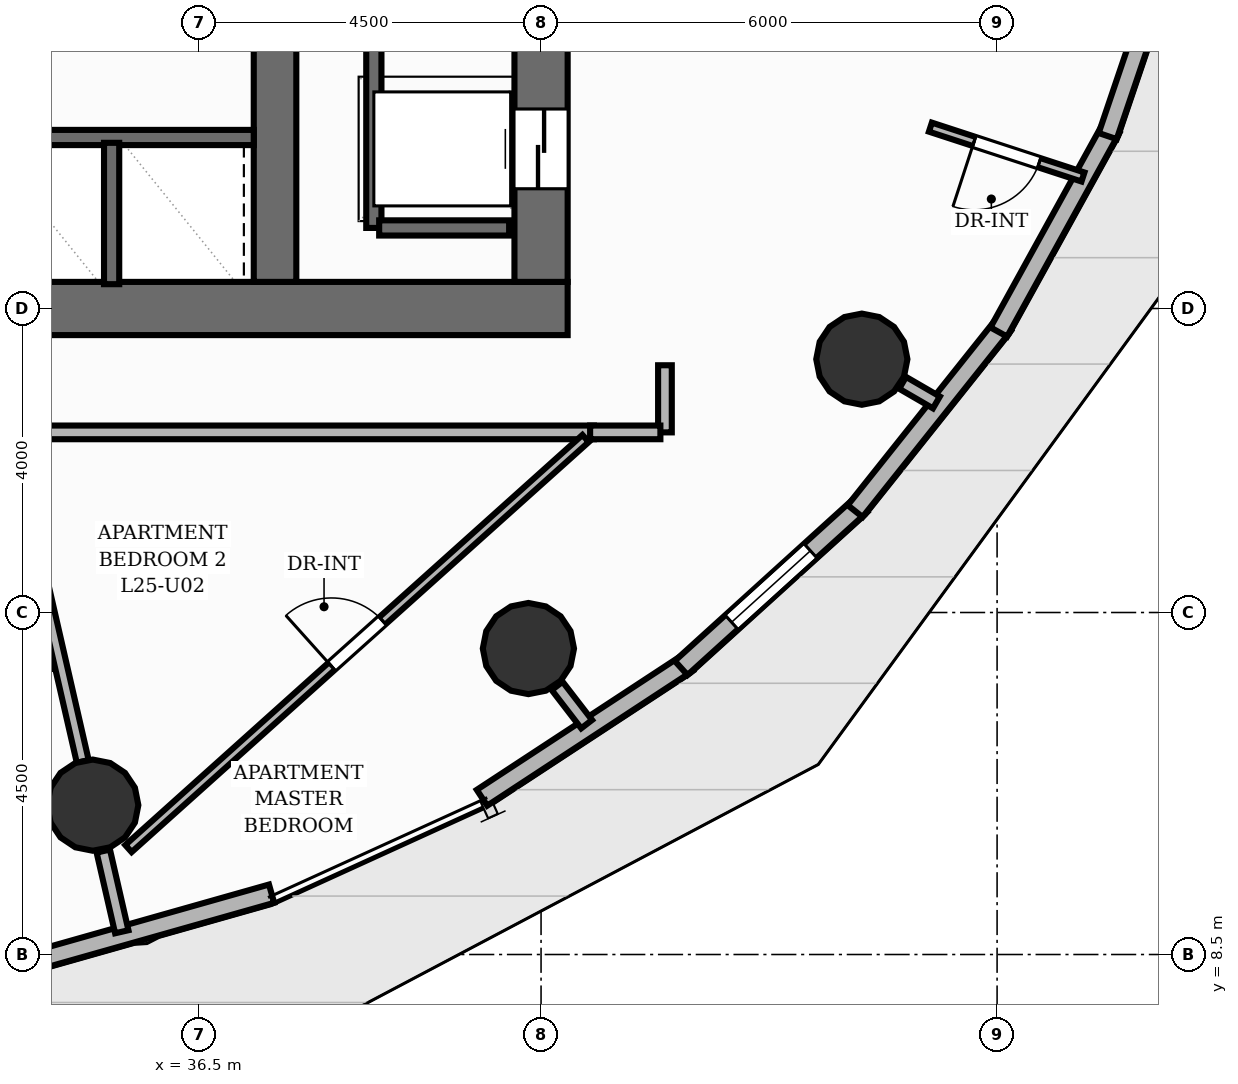
"""IFC4 building model, lengths in metres.
Left out: names, types, materials, properties, quantities, classifications, styles, units other than length and angle.
Written with IfcOpenShell. Run it as: python <this file> out.ifc"""

import sys

from ifc_helpers import new_model, si_unit, direction, frame, frame_2d, origin, origin_2d, place, context, subcontext, project, spatial, rectangle, circle, extrude, element, fill, save


model = new_model("IFC4")
c1 = context("Model", 3, precision=1e-05, world=origin(), true_north=direction((0.0, 1.0)))
c2 = subcontext(c1, "Body", "Model", "MODEL_VIEW")
j1 = project(units=[si_unit("LENGTHUNIT", "METRE"), si_unit("PLANEANGLEUNIT", "RADIAN")], contexts=[c1])
p1 = place(None, origin())
s1 = spatial("IfcSite", under=j1, at=p1, CompositionType="ELEMENT")
p2 = place(p1, origin())
s2 = spatial("IfcBuilding", under=s1, at=p2, CompositionType="ELEMENT")
p3 = place(p2, frame((0.0, 0.0, 86.88)))
s3 = spatial("IfcBuildingStorey", under=s2, at=p3, CompositionType="ELEMENT", Elevation=86.88)
p4 = place(p3, frame((22.65, 17.0, 0.0), z_axis=(0.0, 0.0, 1.0), x_axis=(1.0, 0.0, 0.0)))
e1 = element("IfcWall", 1, at=p4, inside=s3, PredefinedType="SHEAR", context=c2, shape_type="SweptSolid", body=[
    extrude(rectangle(XDim=18.7, YDim=0.7, at=frame_2d((9.35, 0.0))), origin(), (0.0, 0.0, 1.0), 3.2),
])
p5 = place(p4, frame((5.85, 0.0, 0.0)))
e2 = element("IfcOpeningElement", 2, at=p5, cuts=e1, PredefinedType="OPENING", context=c2, shape_type="SweptSolid", body=[
    extrude(rectangle(XDim=1.1, YDim=2.15, at=frame_2d((0.55, 1.075))), frame((0.0, 0.36, 0.0), z_axis=(0.0, -1.0, 0.0), x_axis=(1.0, 0.0, 0.0)), (0.0, 0.0, 1.0), 0.72),
])
p6 = place(p4, frame((9.4, 0.0, 0.0)))
e3 = element("IfcOpeningElement", 3, at=p6, cuts=e1, PredefinedType="OPENING", context=c2, shape_type="SweptSolid", body=[
    extrude(rectangle(XDim=0.9, YDim=2.1, at=frame_2d((0.45, 1.05))), frame((0.0, 0.36, 0.0), z_axis=(0.0, -1.0, 0.0), x_axis=(1.0, 0.0, 0.0)), (0.0, 0.0, 1.0), 0.72),
])
p7 = place(p3, frame((41.0, 17.35, 0.0), z_axis=(0.0, 0.0, 1.0), x_axis=(0.0, 1.0, 0.0)))
e4 = element("IfcWall", 4, at=p7, inside=s3, PredefinedType="SHEAR", context=c2, shape_type="SweptSolid", body=[
    extrude(rectangle(XDim=13.3, YDim=0.7, at=frame_2d((6.65, 0.0))), origin(), (0.0, 0.0, 1.0), 3.2),
])
p8 = place(p7, frame((1.225, 0.0, 0.0)))
e5 = element("IfcOpeningElement", 5, at=p8, cuts=e4, PredefinedType="OPENING", context=c2, shape_type="SweptSolid", body=[
    extrude(rectangle(XDim=1.05, YDim=2.15, at=frame_2d((0.525, 1.075))), frame((0.0, 0.36, 0.0), z_axis=(0.0, -1.0, 0.0), x_axis=(1.0, 0.0, 0.0)), (0.0, 0.0, 1.0), 0.72),
])
p9 = place(p7, frame((4.475, 0.0, 0.0)))
e6 = element("IfcOpeningElement", 6, at=p9, cuts=e4, PredefinedType="OPENING", context=c2, shape_type="SweptSolid", body=[
    extrude(rectangle(XDim=1.05, YDim=2.15, at=frame_2d((0.525, 1.075))), frame((0.0, 0.36, 0.0), z_axis=(0.0, -1.0, 0.0), x_axis=(1.0, 0.0, 0.0)), (0.0, 0.0, 1.0), 0.72),
])
p10 = place(p7, frame((7.775, 0.0, 0.0)))
e7 = element("IfcOpeningElement", 7, at=p10, cuts=e4, PredefinedType="OPENING", context=c2, shape_type="SweptSolid", body=[
    extrude(rectangle(XDim=1.05, YDim=2.15, at=frame_2d((0.525, 1.075))), frame((0.0, 0.36, 0.0), z_axis=(0.0, -1.0, 0.0), x_axis=(1.0, 0.0, 0.0)), (0.0, 0.0, 1.0), 0.72),
])
p11 = place(p7, frame((11.025, 0.0, 0.0)))
e8 = element("IfcOpeningElement", 8, at=p11, cuts=e4, PredefinedType="OPENING", context=c2, shape_type="SweptSolid", body=[
    extrude(rectangle(XDim=1.05, YDim=2.15, at=frame_2d((0.525, 1.075))), frame((0.0, 0.36, 0.0), z_axis=(0.0, -1.0, 0.0), x_axis=(1.0, 0.0, 0.0)), (0.0, 0.0, 1.0), 0.72),
])
p12 = place(p3, frame((37.5, 17.35, 0.0), z_axis=(0.0, 0.0, 1.0), x_axis=(0.0, 1.0, 0.0)))
e9 = element("IfcWall", 9, at=p12, inside=s3, PredefinedType="SHEAR", context=c2, shape_type="SweptSolid", body=[
    extrude(rectangle(XDim=13.3, YDim=0.56, at=frame_2d((6.65, 0.0))), origin(), (0.0, 0.0, 1.0), 3.2),
])
for number, where, z_axis, x_axis in (
    (10, (35.102, 10.465, 0.0), (0.0, 0.0, 1.0), (1.0, 0.0, 0.0)),
    (11, (40.833, 12.526, 0.0), (0.0, 0.0, 1.0), (1.0, 0.0, 0.0)),
    (12, (45.22, 16.333, 0.0), (0.0, 0.0, 1.0), (1.0, 0.0, 0.0)),
):
    element("IfcColumn", number, at=place(p3, frame(where, z_axis=z_axis, x_axis=x_axis)), inside=s3, PredefinedType="COLUMN", context=c2, shape_type="SweptSolid", body=[
        extrude(circle(Radius=0.6, at=origin_2d()), origin(), (0.0, 0.0, 1.0), 3.2),
    ])
p13 = place(p3, frame((37.455, 9.301, 0.0), z_axis=(0.0, 0.0, 1.0), x_axis=(-0.962134911526, -0.272573681825, 0.0)))
e13 = element("IfcWall", 13, at=p13, inside=s3, PredefinedType="SOLIDWALL", context=c2, shape_type="SweptSolid", body=[
    extrude(rectangle(XDim=3.26, YDim=0.25, at=frame_2d((1.63, 0.0))), origin(), (0.0, 0.0, 1.0), 2.96),
])
p14 = place(p3, frame((42.929, 12.337, 0.0), z_axis=(0.0, 0.0, 1.0), x_axis=(-0.836273856728, -0.548311988336, 0.0)))
e14 = element("IfcWall", 14, at=p14, inside=s3, PredefinedType="SOLIDWALL", context=c2, shape_type="SweptSolid", body=[
    extrude(rectangle(XDim=3.236, YDim=0.25, at=frame_2d((1.618, 0.0))), origin(), (0.0, 0.0, 1.0), 2.96),
])
p15 = place(p3, frame((45.208, 14.414, 0.0), z_axis=(0.0, 0.0, 1.0), x_axis=(-0.740832321657, -0.671690011232, 0.0)))
e15 = element("IfcWall", 15, at=p15, inside=s3, PredefinedType="SOLIDWALL", context=c2, shape_type="SweptSolid", body=[
    extrude(rectangle(XDim=3.192, YDim=0.25, at=frame_2d((1.596, 0.0))), origin(), (0.0, 0.0, 1.0), 2.96),
])
p16 = place(p15, frame((0.896, 0.0, 0.85)))
e16 = element("IfcOpeningElement", 16, at=p16, cuts=e15, PredefinedType="OPENING", context=c2, shape_type="SweptSolid", body=[
    extrude(rectangle(XDim=1.4, YDim=1.55, at=frame_2d((0.7, 0.775))), frame((0.0, 0.135, 0.0), z_axis=(0.0, -1.0, 0.0), x_axis=(1.0, 0.0, 0.0)), (0.0, 0.0, 1.0), 0.27),
])
p17 = place(p3, frame((47.084, 16.783, 0.0), z_axis=(0.0, 0.0, 1.0), x_axis=(-0.623134406496, -0.782114768714, 0.0)))
e17 = element("IfcWall", 17, at=p17, inside=s3, PredefinedType="SOLIDWALL", context=c2, shape_type="SweptSolid", body=[
    extrude(rectangle(XDim=3.131, YDim=0.25, at=frame_2d((1.565, 0.0))), origin(), (0.0, 0.0, 1.0), 2.96),
])
p18 = place(p3, frame((48.5, 19.371, 0.0), z_axis=(0.0, 0.0, 1.0), x_axis=(-0.482904421948, -0.875673066426, 0.0)))
e18 = element("IfcWall", 18, at=p18, inside=s3, PredefinedType="SOLIDWALL", context=c2, shape_type="SweptSolid", body=[
    extrude(rectangle(XDim=3.061, YDim=0.25, at=frame_2d((1.53, 0.0))), origin(), (0.0, 0.0, 1.0), 2.96),
])
p19 = place(p3, frame((49.415, 22.099, 0.0), z_axis=(0.0, 0.0, 1.0), x_axis=(-0.321149814784, -0.947028403198, 0.0)))
e19 = element("IfcWall", 19, at=p19, inside=s3, PredefinedType="SOLIDWALL", context=c2, shape_type="SweptSolid", body=[
    extrude(rectangle(XDim=2.988, YDim=0.25, at=frame_2d((1.494, 0.0))), origin(), (0.0, 0.0, 1.0), 2.96),
])
p20 = place(p3, frame((38.8, 18.06, 0.0), z_axis=(0.0, 0.0, 1.0), x_axis=(0.0, 1.0, 0.0)))
e20 = element("IfcWall", 20, at=p20, inside=s3, PredefinedType="SHEAR", context=c2, shape_type="SweptSolid", body=[
    extrude(rectangle(XDim=11.88, YDim=0.2, at=frame_2d((5.94, 0.0))), origin(), (0.0, 0.0, 1.0), 3.2),
])
p21 = place(p3, frame((38.87, 18.06, 0.0), z_axis=(0.0, 0.0, 1.0), x_axis=(1.0, 0.0, 0.0)))
e21 = element("IfcWall", 21, at=p21, inside=s3, PredefinedType="SHEAR", context=c2, shape_type="SweptSolid", body=[
    extrude(rectangle(XDim=1.71, YDim=0.2, at=frame_2d((0.855, 0.0))), origin(), (0.0, 0.0, 1.0), 3.2),
])
p22 = place(p3, frame((33.5, 19.25, 0.0), z_axis=(0.0, 0.0, 1.0), x_axis=(1.0, 0.0, 0.0)))
e22 = element("IfcWall", 22, at=p22, inside=s3, PredefinedType="SHEAR", context=c2, shape_type="SweptSolid", body=[
    extrude(rectangle(XDim=3.72, YDim=0.2, at=frame_2d((1.86, 0.0))), origin(), (0.0, 0.0, 1.0), 3.2),
])
p23 = place(p3, frame((35.35, 17.32, 0.0), z_axis=(0.0, 0.0, 1.0), x_axis=(0.0, 1.0, 0.0)))
e23 = element("IfcWall", 23, at=p23, inside=s3, PredefinedType="SHEAR", context=c2, shape_type="SweptSolid", body=[
    extrude(rectangle(XDim=1.86, YDim=0.2, at=frame_2d((0.93, 0.0))), origin(), (0.0, 0.0, 1.0), 3.2),
])
p24 = place(p3, frame((35.24, 9.861, 0.0), z_axis=(0.0, 0.0, 1.0), x_axis=(0.223287406217, -0.974752652843, 0.0)))
e24 = element("IfcWall", 24, at=p24, inside=s3, PredefinedType="PARTITIONING", context=c2, shape_type="SweptSolid", body=[
    extrude(rectangle(XDim=1.089, YDim=0.18, at=frame_2d((0.544, 0.0))), origin(), (0.0, 0.0, 1.0), 2.261),
])
p25 = place(p3, frame((41.212, 12.034, 0.0), z_axis=(0.0, 0.0, 1.0), x_axis=(0.609970610867, -0.792424036661, 0.0)))
e25 = element("IfcWall", 25, at=p25, inside=s3, PredefinedType="PARTITIONING", context=c2, shape_type="SweptSolid", body=[
    extrude(rectangle(XDim=0.635, YDim=0.18, at=frame_2d((0.318, 0.0))), origin(), (0.0, 0.0, 1.0), 2.261),
])
p26 = place(p3, frame((45.757, 16.022, 0.0), z_axis=(0.0, 0.0, 1.0), x_axis=(0.864981735625, -0.501803344981, 0.0)))
e26 = element("IfcWall", 26, at=p26, inside=s3, PredefinedType="PARTITIONING", context=c2, shape_type="SweptSolid", body=[
    extrude(rectangle(XDim=0.514, YDim=0.18, at=frame_2d((0.257, 0.0))), origin(), (0.0, 0.0, 1.0), 2.261),
])
p27 = place(p3, frame((41.695, 15.37, 0.0), z_axis=(0.0, 0.0, 1.0), x_axis=(-1.0, 0.0, 0.0)))
e27 = element("IfcWall", 27, at=p27, inside=s3, PredefinedType="PARTITIONING", context=c2, shape_type="SweptSolid", body=[
    extrude(rectangle(XDim=20.325, YDim=0.18, at=frame_2d((10.163, 0.0))), origin(), (0.0, 0.0, 1.0), 2.955),
])
p28 = place(p27, frame((11.424, 0.0, 0.0)))
e28 = element("IfcOpeningElement", 28, at=p28, cuts=e27, PredefinedType="OPENING", context=c2, shape_type="SweptSolid", body=[
    extrude(rectangle(XDim=1.05, YDim=2.15, at=frame_2d((0.525, 1.075))), frame((0.0, 0.1, 0.0), z_axis=(0.0, -1.0, 0.0), x_axis=(1.0, 0.0, 0.0)), (0.0, 0.0, 1.0), 0.2),
])
p29 = place(p3, frame((42.63, 16.253, 0.0), z_axis=(0.0, 0.0, 1.0), x_axis=(0.0, -1.0, 0.0)))
e29 = element("IfcWall", 29, at=p29, inside=s3, PredefinedType="PARTITIONING", context=c2, shape_type="SweptSolid", body=[
    extrude(rectangle(XDim=0.883, YDim=0.18, at=frame_2d((0.441, 0.0))), origin(), (0.0, 0.0, 1.0), 2.955),
])
p30 = place(p3, frame((42.57, 15.37, 0.0), z_axis=(0.0, 0.0, 1.0), x_axis=(-1.0, 0.0, 0.0)))
e30 = element("IfcWall", 30, at=p30, inside=s3, PredefinedType="PARTITIONING", context=c2, shape_type="SweptSolid", body=[
    extrude(rectangle(XDim=0.925, YDim=0.18, at=frame_2d((0.462, 0.0))), origin(), (0.0, 0.0, 1.0), 2.955),
])
p31 = place(p3, frame((31.077, 12.707, 0.0), z_axis=(0.0, 0.0, 1.0), x_axis=(0.994472124215, -0.105000924563, 0.0)))
e31 = element("IfcWall", 31, at=p31, inside=s3, PredefinedType="PLUMBINGWALL", context=c2, shape_type="SweptSolid", body=[
    extrude(rectangle(XDim=3.618, YDim=0.16, at=frame_2d((1.809, 0.0))), origin(), (0.0, 0.0, 1.0), 2.955),
])
p32 = place(p3, frame((33.978, 15.37, 0.0), z_axis=(0.0, 0.0, 1.0), x_axis=(0.223321757884, -0.974744783241, 0.0)))
e32 = element("IfcWall", 32, at=p32, inside=s3, PredefinedType="PLUMBINGWALL", context=c2, shape_type="SweptSolid", body=[
    extrude(rectangle(XDim=4.442, YDim=0.16, at=frame_2d((2.221, 0.0))), origin(), (0.0, 0.0, 1.0), 2.261),
])
p33 = place(p3, frame((48.13, 18.73, 0.0), z_axis=(0.0, 0.0, 1.0), x_axis=(-0.950573429935, 0.310499845896, 0.0)))
e33 = element("IfcWall", 33, at=p33, inside=s3, PredefinedType="PARTITIONING", context=c2, shape_type="SweptSolid", body=[
    extrude(rectangle(XDim=2.112, YDim=0.125, at=frame_2d((1.056, 0.0))), origin(), (0.0, 0.0, 1.0), 2.955),
])
p34 = place(p33, frame((0.606, 0.0, 0.0)))
e34 = element("IfcOpeningElement", 34, at=p34, cuts=e33, PredefinedType="OPENING", context=c2, shape_type="SweptSolid", body=[
    extrude(rectangle(XDim=0.9, YDim=2.1, at=frame_2d((0.45, 1.05))), frame((0.0, 0.073, 0.0), z_axis=(0.0, -1.0, 0.0), x_axis=(1.0, 0.0, 0.0)), (0.0, 0.0, 1.0), 0.145),
])
p35 = place(p3, frame((35.571, 9.894, 0.0), z_axis=(0.0, 0.0, 1.0), x_axis=(0.744379363772, 0.667756963865, 0.0)))
e35 = element("IfcWall", 35, at=p35, inside=s3, PredefinedType="PARTITIONING", context=c2, shape_type="SweptSolid", body=[
    extrude(rectangle(XDim=8.08, YDim=0.125, at=frame_2d((4.04, 0.0))), origin(), (0.0, 0.0, 1.0), 2.404),
])
p36 = place(p35, frame((3.59, 0.0, 0.0)))
e36 = element("IfcOpeningElement", 36, at=p36, cuts=e35, PredefinedType="OPENING", context=c2, shape_type="SweptSolid", body=[
    extrude(rectangle(XDim=0.9, YDim=2.1, at=frame_2d((0.45, 1.05))), frame((0.0, 0.073, 0.0), z_axis=(0.0, -1.0, 0.0), x_axis=(1.0, 0.0, 0.0)), (0.0, 0.0, 1.0), 0.145),
])
p37 = place(p16, origin())
e37 = element("IfcWindow", 37, at=p37, inside=s3, PartitioningType="SINGLE_PANEL", PredefinedType="WINDOW", context=c2, shape_type="SweptSolid", body=[
    extrude(rectangle(XDim=1.4, YDim=1.55, at=frame_2d((0.7, 0.775))), frame((0.0, 0.03, 0.0), z_axis=(0.0, -1.0, 0.0), x_axis=(1.0, 0.0, 0.0)), (0.0, 0.0, 1.0), 0.06),
])
fill(e16, e37)
p38 = place(p8, origin())
e38 = element("IfcDoor", 38, at=p38, inside=s3, OperationType="DOUBLE_DOOR_SLIDING", PredefinedType="DOOR", context=c2, shape_type="SweptSolid", body=[
    extrude(rectangle(XDim=1.05, YDim=2.15, at=frame_2d((0.525, 1.075))), frame((0.0, 0.025, 0.0), z_axis=(0.0, -1.0, 0.0), x_axis=(1.0, 0.0, 0.0)), (0.0, 0.0, 1.0), 0.05),
])
fill(e5, e38)
p39 = place(p34, origin())
e39 = element("IfcDoor", 39, at=p39, inside=s3, OperationType="SINGLE_SWING_RIGHT", PredefinedType="DOOR", context=c2, shape_type="SweptSolid", body=[
    extrude(rectangle(XDim=0.9, YDim=2.1, at=frame_2d((0.45, 1.05))), frame((0.0, 0.025, 0.0), z_axis=(0.0, -1.0, 0.0), x_axis=(1.0, 0.0, 0.0)), (0.0, 0.0, 1.0), 0.05),
])
fill(e34, e39)
p40 = place(p36, origin())
e40 = element("IfcDoor", 40, at=p40, inside=s3, OperationType="SINGLE_SWING_LEFT", PredefinedType="DOOR", context=c2, shape_type="SweptSolid", body=[
    extrude(rectangle(XDim=0.9, YDim=2.1, at=frame_2d((0.45, 1.05))), frame((0.0, 0.025, 0.0), z_axis=(0.0, -1.0, 0.0), x_axis=(1.0, 0.0, 0.0)), (0.0, 0.0, 1.0), 0.05),
])
fill(e36, e40)
save(model, sys.argv[1])
